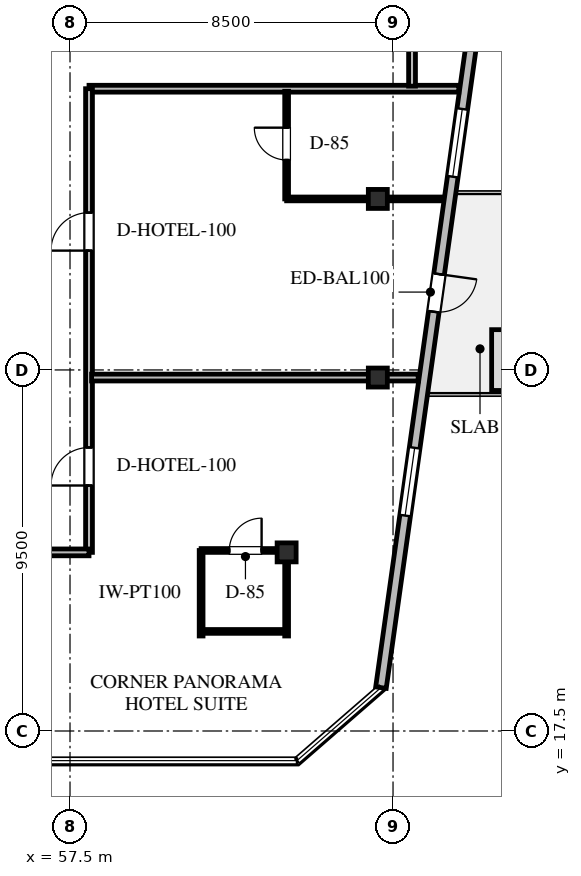
"""IFC4 building model, lengths in metres.
Left out: names, types, materials, properties, quantities, classifications, styles, units other than length and angle.
Written with IfcOpenShell. Run it as: python <this file> out.ifc"""

import sys

from ifc_helpers import new_model, si_unit, direction, frame, frame_2d, origin, origin_2d, place, context, subcontext, project, spatial, rectangle, hollow_rectangle, extrude, element, fill, save


model = new_model("IFC4")
c1 = context("Model", 3, precision=1e-05, world=origin(), true_north=direction((0.0, 1.0)))
c2 = subcontext(c1, "Body", "Model", "MODEL_VIEW")
j1 = project(units=[si_unit("LENGTHUNIT", "METRE"), si_unit("PLANEANGLEUNIT", "RADIAN")], contexts=[c1])
p1 = place(None, origin())
s1 = spatial("IfcSite", under=j1, at=p1, CompositionType="ELEMENT")
p2 = place(p1, origin())
s2 = spatial("IfcBuilding", under=s1, at=p2, CompositionType="ELEMENT")
p3 = place(p2, frame((0.0, 0.0, 241.8)))
s3 = spatial("IfcBuildingStorey", under=s2, at=p3, CompositionType="ELEMENT", Elevation=241.8)
for number, where, z_axis, x_axis in (
    (1, (65.6, 31.5, 0.0), (0.0, 0.0, 1.0), (1.0, 0.0, 0.0)),
    (2, (65.6, 26.8, 0.0), (0.0, 0.0, 1.0), (1.0, 0.0, 0.0)),
    (3, (63.2, 22.2, 0.0), (0.0, 0.0, 1.0), (1.0, 0.0, 0.0)),
):
    element("IfcColumn", number, at=place(p3, frame(where, z_axis=z_axis, x_axis=x_axis)), inside=s3, PredefinedType="COLUMN", context=c2, shape_type="SweptSolid", body=[
        extrude(hollow_rectangle(XDim=0.5, YDim=0.5, WallThickness=0.02, at=origin_2d()), origin(), (0.0, 0.0, 1.0), 3.6),
    ])
p4 = place(p3, frame((68.375, 37.8, 0.0), z_axis=(0.0, 0.0, 1.0), x_axis=(-0.139164922175, -0.99026921816, 0.0)))
e4 = element("IfcWall", 4, at=p4, inside=s3, PredefinedType="STANDARD", context=c2, shape_type="SweptSolid", body=[
    extrude(rectangle(XDim=19.347, YDim=0.28, at=frame_2d((9.673, 0.0))), origin(), (0.0, 0.0, 1.0), 3.35),
])
p5 = place(p4, frame((8.36, 0.0, 0.0)))
e5 = element("IfcOpeningElement", 5, at=p5, cuts=e4, PredefinedType="OPENING", context=c2, shape_type="SweptSolid", body=[
    extrude(rectangle(XDim=1.0, YDim=2.15, at=frame_2d((0.5, 1.075))), frame((0.0, 0.15, 0.0), z_axis=(0.0, -1.0, 0.0), x_axis=(1.0, 0.0, 0.0)), (0.0, 0.0, 1.0), 0.3),
])
p6 = place(p4, frame((3.971, 0.0, 0.65)))
e6 = element("IfcOpeningElement", 6, at=p6, cuts=e4, PredefinedType="OPENING", context=c2, shape_type="SweptSolid", body=[
    extrude(rectangle(XDim=1.8, YDim=2.1, at=frame_2d((0.9, 1.05))), frame((0.0, 0.15, 0.0), z_axis=(0.0, -1.0, 0.0), x_axis=(1.0, 0.0, 0.0)), (0.0, 0.0, 1.0), 0.3),
])
p7 = place(p4, frame((12.975, 0.0, 0.65)))
e7 = element("IfcOpeningElement", 7, at=p7, cuts=e4, PredefinedType="OPENING", context=c2, shape_type="SweptSolid", body=[
    extrude(rectangle(XDim=1.8, YDim=2.1, at=frame_2d((0.9, 1.05))), frame((0.0, 0.15, 0.0), z_axis=(0.0, -1.0, 0.0), x_axis=(1.0, 0.0, 0.0)), (0.0, 0.0, 1.0), 0.3),
])
p8 = place(p3, frame((58.0, 34.4, 0.0), z_axis=(0.0, 0.0, 1.0), x_axis=(1.0, 0.0, 0.0)))
e8 = element("IfcWall", 8, at=p8, inside=s3, PredefinedType="STANDARD", context=c2, shape_type="SweptSolid", body=[
    extrude(rectangle(XDim=9.731, YDim=0.18, at=frame_2d((4.865, 0.0))), origin(), (0.0, 0.0, 1.0), 3.35),
])
p9 = place(p3, frame((66.5, 34.468, 0.0), z_axis=(0.0, 0.0, 1.0), x_axis=(0.0, 1.0, 0.0)))
e9 = element("IfcWall", 9, at=p9, inside=s3, PredefinedType="STANDARD", context=c2, shape_type="SweptSolid", body=[
    extrude(rectangle(XDim=3.582, YDim=0.18, at=frame_2d((1.791, 0.0))), origin(), (0.0, 0.0, 1.0), 2.654),
])
p10 = place(p3, frame((58.0, 22.2, 0.0), z_axis=(0.0, 0.0, 1.0), x_axis=(0.0, 1.0, 0.0)))
e10 = element("IfcWall", 10, at=p10, inside=s3, PredefinedType="STANDARD", context=c2, shape_type="SweptSolid", body=[
    extrude(rectangle(XDim=12.2, YDim=0.18, at=frame_2d((6.1, 0.0))), origin(), (0.0, 0.0, 1.0), 2.654),
])
p11 = place(p10, frame((1.76, 0.0, 0.0)))
e11 = element("IfcOpeningElement", 11, at=p11, cuts=e10, PredefinedType="OPENING", context=c2, shape_type="SweptSolid", body=[
    extrude(rectangle(XDim=1.0, YDim=2.15, at=frame_2d((0.5, 1.075))), frame((0.0, 0.1, 0.0), z_axis=(0.0, -1.0, 0.0), x_axis=(1.0, 0.0, 0.0)), (0.0, 0.0, 1.0), 0.2),
])
p12 = place(p10, frame((7.94, 0.0, 0.0)))
e12 = element("IfcOpeningElement", 12, at=p12, cuts=e10, PredefinedType="OPENING", context=c2, shape_type="SweptSolid", body=[
    extrude(rectangle(XDim=1.0, YDim=2.15, at=frame_2d((0.5, 1.075))), frame((0.0, 0.1, 0.0), z_axis=(0.0, -1.0, 0.0), x_axis=(1.0, 0.0, 0.0)), (0.0, 0.0, 1.0), 0.2),
])
p13 = place(p3, frame((56.0, 22.2, 0.0), z_axis=(0.0, 0.0, 1.0), x_axis=(1.0, 0.0, 0.0)))
e13 = element("IfcWall", 13, at=p13, inside=s3, PredefinedType="STANDARD", context=c2, shape_type="SweptSolid", body=[
    extrude(rectangle(XDim=2.0, YDim=0.18, at=frame_2d((1.0, 0.0))), origin(), (0.0, 0.0, 1.0), 2.654),
])
p14 = place(p3, frame((58.068, 26.8, 0.0), z_axis=(0.0, 0.0, 1.0), x_axis=(1.0, 0.0, 0.0)))
e14 = element("IfcWall", 14, at=p14, inside=s3, PredefinedType="STANDARD", context=c2, shape_type="SweptSolid", body=[
    extrude(rectangle(XDim=8.594, YDim=0.18, at=frame_2d((4.297, 0.0))), origin(), (0.0, 0.0, 1.0), 2.654),
])
p15 = place(p3, frame((60.95, 22.25, 0.0), z_axis=(0.0, 0.0, 1.0), x_axis=(1.0, 0.0, 0.0)))
e15 = element("IfcWall", 15, at=p15, inside=s3, PredefinedType="PARTITIONING", context=c2, shape_type="SweptSolid", body=[
    extrude(rectangle(XDim=2.25, YDim=0.1, at=frame_2d((1.125, 0.0))), origin(), (0.0, 0.0, 1.0), 2.654),
])
p16 = place(p15, frame((0.741, 0.0, 0.0)))
e16 = element("IfcOpeningElement", 16, at=p16, cuts=e15, PredefinedType="OPENING", context=c2, shape_type="SweptSolid", body=[
    extrude(rectangle(XDim=0.85, YDim=2.1, at=frame_2d((0.425, 1.05))), frame((0.0, 0.06, 0.0), z_axis=(0.0, -1.0, 0.0), x_axis=(1.0, 0.0, 0.0)), (0.0, 0.0, 1.0), 0.12),
])
for number, where, z_axis, x_axis in (
    (17, (60.95, 20.0, 0.0), (0.0, 0.0, 1.0), (0.0, 1.0, 0.0)),
    (18, (63.2, 20.0, 0.0), (0.0, 0.0, 1.0), (0.0, 1.0, 0.0)),
):
    element("IfcWall", number, at=place(p3, frame(where, z_axis=z_axis, x_axis=x_axis)), inside=s3, PredefinedType="PARTITIONING", context=c2, shape_type="SweptSolid", body=[
        extrude(rectangle(XDim=2.25, YDim=0.1, at=frame_2d((1.125, 0.0))), origin(), (0.0, 0.0, 1.0), 2.654),
    ])
p17 = place(p3, frame((61.018, 20.12, 0.0), z_axis=(0.0, 0.0, 1.0), x_axis=(1.0, 0.0, 0.0)))
e19 = element("IfcWall", 19, at=p17, inside=s3, PredefinedType="PARTITIONING", context=c2, shape_type="SweptSolid", body=[
    extrude(rectangle(XDim=2.114, YDim=0.1, at=frame_2d((1.057, 0.0))), origin(), (0.0, 0.0, 1.0), 3.35),
])
p18 = place(p3, frame((63.2, 31.5, 0.0), z_axis=(0.0, 0.0, 1.0), x_axis=(1.0, 0.0, 0.0)))
e20 = element("IfcWall", 20, at=p18, inside=s3, PredefinedType="PARTITIONING", context=c2, shape_type="SweptSolid", body=[
    extrude(rectangle(XDim=4.123, YDim=0.1, at=frame_2d((2.062, 0.0))), origin(), (0.0, 0.0, 1.0), 2.654),
])
p19 = place(p3, frame((63.2, 31.5, 0.0), z_axis=(0.0, 0.0, 1.0), x_axis=(0.0, 1.0, 0.0)))
e21 = element("IfcWall", 21, at=p19, inside=s3, PredefinedType="PARTITIONING", context=c2, shape_type="SweptSolid", body=[
    extrude(rectangle(XDim=2.832, YDim=0.1, at=frame_2d((1.416, 0.0))), origin(), (0.0, 0.0, 1.0), 2.654),
])
p20 = place(p19, frame((1.025, 0.0, 0.0)))
e22 = element("IfcOpeningElement", 22, at=p20, cuts=e21, PredefinedType="OPENING", context=c2, shape_type="SweptSolid", body=[
    extrude(rectangle(XDim=0.85, YDim=2.1, at=frame_2d((0.425, 1.05))), frame((0.0, 0.06, 0.0), z_axis=(0.0, -1.0, 0.0), x_axis=(1.0, 0.0, 0.0)), (0.0, 0.0, 1.0), 0.12),
])
p21 = place(p5, origin())
e23 = element("IfcDoor", 23, at=p21, inside=s3, OperationType="SINGLE_SWING_LEFT", PredefinedType="DOOR", context=c2, shape_type="SweptSolid", body=[
    extrude(rectangle(XDim=1.0, YDim=2.15, at=frame_2d((0.5, 1.075))), frame((0.0, 0.025, 0.0), z_axis=(0.0, -1.0, 0.0), x_axis=(1.0, 0.0, 0.0)), (0.0, 0.0, 1.0), 0.05),
])
fill(e5, e23)
p22 = place(p6, origin())
e24 = element("IfcWindow", 24, at=p22, inside=s3, PartitioningType="SINGLE_PANEL", PredefinedType="WINDOW", context=c2, shape_type="SweptSolid", body=[
    extrude(rectangle(XDim=1.8, YDim=2.1, at=frame_2d((0.9, 1.05))), frame((0.0, 0.03, 0.0), z_axis=(0.0, -1.0, 0.0), x_axis=(1.0, 0.0, 0.0)), (0.0, 0.0, 1.0), 0.06),
])
fill(e6, e24)
p23 = place(p7, origin())
e25 = element("IfcWindow", 25, at=p23, inside=s3, PartitioningType="SINGLE_PANEL", PredefinedType="WINDOW", context=c2, shape_type="SweptSolid", body=[
    extrude(rectangle(XDim=1.8, YDim=2.1, at=frame_2d((0.9, 1.05))), frame((0.0, 0.03, 0.0), z_axis=(0.0, -1.0, 0.0), x_axis=(1.0, 0.0, 0.0)), (0.0, 0.0, 1.0), 0.06),
])
fill(e7, e25)
p24 = place(p11, origin())
e26 = element("IfcDoor", 26, at=p24, inside=s3, OperationType="SINGLE_SWING_LEFT", PredefinedType="DOOR", context=c2, shape_type="SweptSolid", body=[
    extrude(rectangle(XDim=1.0, YDim=2.15, at=frame_2d((0.5, 1.075))), frame((0.0, 0.025, 0.0), z_axis=(0.0, -1.0, 0.0), x_axis=(1.0, 0.0, 0.0)), (0.0, 0.0, 1.0), 0.05),
])
fill(e11, e26)
p25 = place(p16, origin())
e27 = element("IfcDoor", 27, at=p25, inside=s3, OperationType="SINGLE_SWING_RIGHT", PredefinedType="DOOR", context=c2, shape_type="SweptSolid", body=[
    extrude(rectangle(XDim=0.85, YDim=2.1, at=frame_2d((0.425, 1.05))), frame((0.0, 0.025, 0.0), z_axis=(0.0, -1.0, 0.0), x_axis=(1.0, 0.0, 0.0)), (0.0, 0.0, 1.0), 0.05),
])
fill(e16, e27)
p26 = place(p12, origin())
e28 = element("IfcDoor", 28, at=p26, inside=s3, OperationType="SINGLE_SWING_LEFT", PredefinedType="DOOR", context=c2, shape_type="SweptSolid", body=[
    extrude(rectangle(XDim=1.0, YDim=2.15, at=frame_2d((0.5, 1.075))), frame((0.0, 0.025, 0.0), z_axis=(0.0, -1.0, 0.0), x_axis=(1.0, 0.0, 0.0)), (0.0, 0.0, 1.0), 0.05),
])
fill(e12, e28)
p27 = place(p20, origin())
e29 = element("IfcDoor", 29, at=p27, inside=s3, OperationType="SINGLE_SWING_RIGHT", PredefinedType="DOOR", context=c2, shape_type="SweptSolid", body=[
    extrude(rectangle(XDim=0.85, YDim=2.1, at=frame_2d((0.425, 1.05))), frame((0.0, 0.025, 0.0), z_axis=(0.0, -1.0, 0.0), x_axis=(1.0, 0.0, 0.0)), (0.0, 0.0, 1.0), 0.05),
])
fill(e22, e29)
save(model, sys.argv[1])
